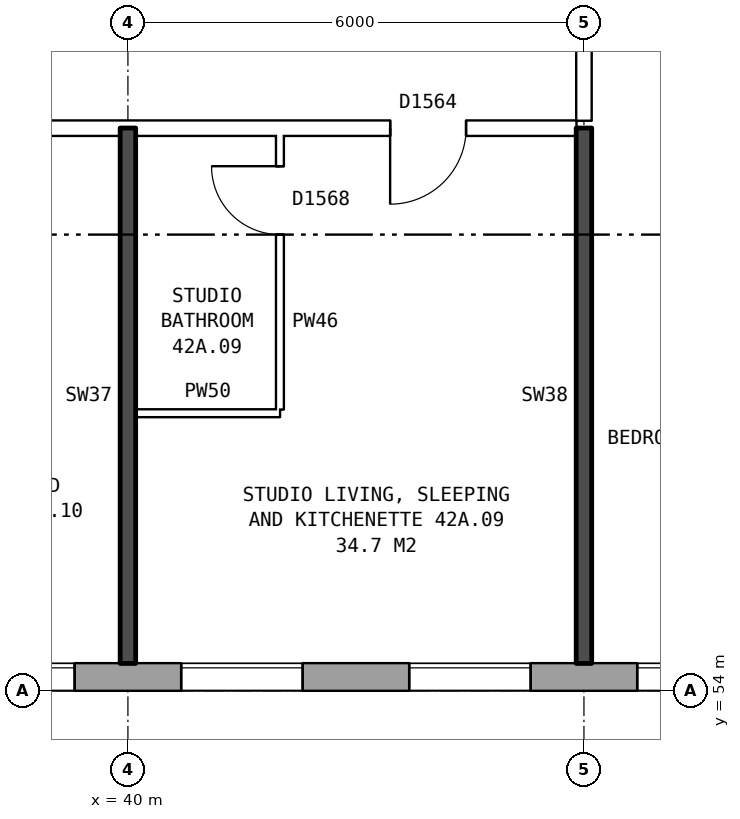
"""IFC4 building model, lengths in metres.
Left out: names, types, materials, properties, quantities, classifications, styles, units other than length and angle.
Written with IfcOpenShell. Run it as: python <this file> out.ifc"""

import sys

from ifc_helpers import new_model, si_unit, direction, frame, frame_2d, origin, place, context, subcontext, project, spatial, rectangle, extrude, element, fill, save


model = new_model("IFC4")
c1 = context("Model", 3, precision=1e-05, world=origin(), true_north=direction((0.0, 1.0)))
c2 = subcontext(c1, "Body", "Model", "MODEL_VIEW")
j1 = project(units=[si_unit("LENGTHUNIT", "METRE"), si_unit("PLANEANGLEUNIT", "RADIAN")], contexts=[c1])
p1 = place(None, origin())
s1 = spatial("IfcSite", under=j1, at=p1, CompositionType="ELEMENT")
p2 = place(p1, origin())
s2 = spatial("IfcBuilding", under=s1, at=p2, CompositionType="ELEMENT")
p3 = place(p2, frame((0.0, 0.0, 151.6)))
s3 = spatial("IfcBuildingStorey", under=s2, at=p3, CompositionType="ELEMENT", Elevation=151.6)
p4 = place(p3, frame((31.575, 54.18, 0.0), z_axis=(0.0, 0.0, 1.0), x_axis=(1.0, 0.0, 0.0)))
e1 = element("IfcWall", 1, at=p4, inside=s3, PredefinedType="STANDARD", context=c2, shape_type="SweptSolid", body=[
    extrude(rectangle(XDim=41.351, YDim=0.36, at=frame_2d((20.675, 0.0))), origin(), (0.0, 0.0, 1.0), 2.85),
])
p5 = place(p4, frame((4.625, 0.0, 0.8)))
e2 = element("IfcOpeningElement", 2, at=p5, cuts=e1, PredefinedType="OPENING", context=c2, shape_type="SweptSolid", body=[
    extrude(rectangle(XDim=1.2, YDim=1.2, at=frame_2d((0.6, 0.6))), frame((0.0, 0.19, 0.0), z_axis=(0.0, -1.0, 0.0), x_axis=(1.0, 0.0, 0.0)), (0.0, 0.0, 1.0), 0.38),
])
p6 = place(p4, frame((6.125, 0.0, 0.8)))
e3 = element("IfcOpeningElement", 3, at=p6, cuts=e1, PredefinedType="OPENING", context=c2, shape_type="SweptSolid", body=[
    extrude(rectangle(XDim=1.6, YDim=1.8, at=frame_2d((0.8, 0.9))), frame((0.0, 0.19, 0.0), z_axis=(0.0, -1.0, 0.0), x_axis=(1.0, 0.0, 0.0)), (0.0, 0.0, 1.0), 0.38),
])
p7 = place(p4, frame((9.125, 0.0, 0.8)))
e4 = element("IfcOpeningElement", 4, at=p7, cuts=e1, PredefinedType="OPENING", context=c2, shape_type="SweptSolid", body=[
    extrude(rectangle(XDim=1.6, YDim=1.8, at=frame_2d((0.8, 0.9))), frame((0.0, 0.19, 0.0), z_axis=(0.0, -1.0, 0.0), x_axis=(1.0, 0.0, 0.0)), (0.0, 0.0, 1.0), 0.38),
])
p8 = place(p4, frame((12.125, 0.0, 0.8)))
e5 = element("IfcOpeningElement", 5, at=p8, cuts=e1, PredefinedType="OPENING", context=c2, shape_type="SweptSolid", body=[
    extrude(rectangle(XDim=1.6, YDim=1.8, at=frame_2d((0.8, 0.9))), frame((0.0, 0.19, 0.0), z_axis=(0.0, -1.0, 0.0), x_axis=(1.0, 0.0, 0.0)), (0.0, 0.0, 1.0), 0.38),
])
p9 = place(p4, frame((15.125, 0.0, 0.8)))
e6 = element("IfcOpeningElement", 6, at=p9, cuts=e1, PredefinedType="OPENING", context=c2, shape_type="SweptSolid", body=[
    extrude(rectangle(XDim=1.6, YDim=1.8, at=frame_2d((0.8, 0.9))), frame((0.0, 0.19, 0.0), z_axis=(0.0, -1.0, 0.0), x_axis=(1.0, 0.0, 0.0)), (0.0, 0.0, 1.0), 0.38),
])
p10 = place(p4, frame((18.125, 0.0, 0.8)))
e7 = element("IfcOpeningElement", 7, at=p10, cuts=e1, PredefinedType="OPENING", context=c2, shape_type="SweptSolid", body=[
    extrude(rectangle(XDim=1.6, YDim=1.8, at=frame_2d((0.8, 0.9))), frame((0.0, 0.19, 0.0), z_axis=(0.0, -1.0, 0.0), x_axis=(1.0, 0.0, 0.0)), (0.0, 0.0, 1.0), 0.38),
])
p11 = place(p4, frame((21.125, 0.0, 0.8)))
e8 = element("IfcOpeningElement", 8, at=p11, cuts=e1, PredefinedType="OPENING", context=c2, shape_type="SweptSolid", body=[
    extrude(rectangle(XDim=1.6, YDim=1.8, at=frame_2d((0.8, 0.9))), frame((0.0, 0.19, 0.0), z_axis=(0.0, -1.0, 0.0), x_axis=(1.0, 0.0, 0.0)), (0.0, 0.0, 1.0), 0.38),
])
p12 = place(p4, frame((24.125, 0.0, 0.8)))
e9 = element("IfcOpeningElement", 9, at=p12, cuts=e1, PredefinedType="OPENING", context=c2, shape_type="SweptSolid", body=[
    extrude(rectangle(XDim=1.6, YDim=1.8, at=frame_2d((0.8, 0.9))), frame((0.0, 0.19, 0.0), z_axis=(0.0, -1.0, 0.0), x_axis=(1.0, 0.0, 0.0)), (0.0, 0.0, 1.0), 0.38),
])
p13 = place(p4, frame((27.125, 0.0, 0.8)))
e10 = element("IfcOpeningElement", 10, at=p13, cuts=e1, PredefinedType="OPENING", context=c2, shape_type="SweptSolid", body=[
    extrude(rectangle(XDim=1.6, YDim=1.8, at=frame_2d((0.8, 0.9))), frame((0.0, 0.19, 0.0), z_axis=(0.0, -1.0, 0.0), x_axis=(1.0, 0.0, 0.0)), (0.0, 0.0, 1.0), 0.38),
])
p14 = place(p4, frame((30.125, 0.0, 0.8)))
e11 = element("IfcOpeningElement", 11, at=p14, cuts=e1, PredefinedType="OPENING", context=c2, shape_type="SweptSolid", body=[
    extrude(rectangle(XDim=1.6, YDim=1.8, at=frame_2d((0.8, 0.9))), frame((0.0, 0.19, 0.0), z_axis=(0.0, -1.0, 0.0), x_axis=(1.0, 0.0, 0.0)), (0.0, 0.0, 1.0), 0.38),
])
p15 = place(p4, frame((33.125, 0.0, 0.8)))
e12 = element("IfcOpeningElement", 12, at=p15, cuts=e1, PredefinedType="OPENING", context=c2, shape_type="SweptSolid", body=[
    extrude(rectangle(XDim=1.6, YDim=1.8, at=frame_2d((0.8, 0.9))), frame((0.0, 0.19, 0.0), z_axis=(0.0, -1.0, 0.0), x_axis=(1.0, 0.0, 0.0)), (0.0, 0.0, 1.0), 0.38),
])
p16 = place(p4, frame((35.025, 0.0, 0.8)))
e13 = element("IfcOpeningElement", 13, at=p16, cuts=e1, PredefinedType="OPENING", context=c2, shape_type="SweptSolid", body=[
    extrude(rectangle(XDim=0.8, YDim=1.8, at=frame_2d((0.4, 0.9))), frame((0.0, 0.19, 0.0), z_axis=(0.0, -1.0, 0.0), x_axis=(1.0, 0.0, 0.0)), (0.0, 0.0, 1.0), 0.38),
])
p17 = place(p4, frame((38.625, 0.0, 1.5)))
e14 = element("IfcOpeningElement", 14, at=p17, cuts=e1, PredefinedType="OPENING", context=c2, shape_type="SweptSolid", body=[
    extrude(rectangle(XDim=0.6, YDim=0.9, at=frame_2d((0.3, 0.45))), frame((0.0, 0.19, 0.0), z_axis=(0.0, -1.0, 0.0), x_axis=(1.0, 0.0, 0.0)), (0.0, 0.0, 1.0), 0.38),
])
p18 = place(p4, frame((36.125, 0.0, 0.8)))
e15 = element("IfcOpeningElement", 15, at=p18, cuts=e1, PredefinedType="OPENING", context=c2, shape_type="SweptSolid", body=[
    extrude(rectangle(XDim=1.0, YDim=0.9, at=frame_2d((0.5, 0.45))), frame((0.0, 0.19, 0.0), z_axis=(0.0, -1.0, 0.0), x_axis=(1.0, 0.0, 0.0)), (0.0, 0.0, 1.0), 0.38),
])
p19 = place(p4, frame((39.525, 0.0, 0.8)))
e16 = element("IfcOpeningElement", 16, at=p19, cuts=e1, PredefinedType="OPENING", context=c2, shape_type="SweptSolid", body=[
    extrude(rectangle(XDim=1.4, YDim=1.8, at=frame_2d((0.7, 0.9))), frame((0.0, 0.19, 0.0), z_axis=(0.0, -1.0, 0.0), x_axis=(1.0, 0.0, 0.0)), (0.0, 0.0, 1.0), 0.38),
])
p20 = place(p3, frame((40.1, 57.65, 0.0), z_axis=(0.0, 0.0, 1.0), x_axis=(1.0, 0.0, 0.0)))
e17 = element("IfcWall", 17, at=p20, inside=s3, PredefinedType="PARTITIONING", context=c2, shape_type="SweptSolid", body=[
    extrude(rectangle(XDim=1.9, YDim=0.1, at=frame_2d((0.95, 0.0))), origin(), (0.0, 0.0, 1.0), 2.85),
])
p21 = place(p3, frame((28.86, 61.4, 0.0), z_axis=(0.0, 0.0, 1.0), x_axis=(1.0, 0.0, 0.0)))
e18 = element("IfcWall", 18, at=p21, inside=s3, PredefinedType="PARTITIONING", context=c2, shape_type="SweptSolid", body=[
    extrude(rectangle(XDim=17.04, YDim=0.2, at=frame_2d((8.52, 0.0))), origin(), (0.0, 0.0, 1.0), 2.85),
])
p22 = place(p21, frame((14.59, 0.0, 0.0)))
e19 = element("IfcOpeningElement", 19, at=p22, cuts=e18, PredefinedType="OPENING", context=c2, shape_type="SweptSolid", body=[
    extrude(rectangle(XDim=1.0, YDim=2.1, at=frame_2d((0.5, 1.05))), frame((0.0, 0.11, 0.0), z_axis=(0.0, -1.0, 0.0), x_axis=(1.0, 0.0, 0.0)), (0.0, 0.0, 1.0), 0.22),
])
p23 = place(p21, frame((7.64, 0.0, 0.0)))
e20 = element("IfcOpeningElement", 20, at=p23, cuts=e18, PredefinedType="OPENING", context=c2, shape_type="SweptSolid", body=[
    extrude(rectangle(XDim=1.0, YDim=2.1, at=frame_2d((0.5, 1.05))), frame((0.0, 0.11, 0.0), z_axis=(0.0, -1.0, 0.0), x_axis=(1.0, 0.0, 0.0)), (0.0, 0.0, 1.0), 0.22),
])
p24 = place(p3, frame((40.0, 54.36, 0.0), z_axis=(0.0, 0.0, 1.0), x_axis=(0.0, 1.0, 0.0)))
e21 = element("IfcWall", 21, at=p24, inside=s3, PredefinedType="SOLIDWALL", context=c2, shape_type="SweptSolid", body=[
    extrude(rectangle(XDim=7.04, YDim=0.2, at=frame_2d((3.52, 0.0))), origin(), (0.0, 0.0, 1.0), 2.85),
])
p25 = place(p3, frame((42.0, 57.7, 0.0), z_axis=(0.0, 0.0, 1.0), x_axis=(0.0, 1.0, 0.0)))
e22 = element("IfcWall", 22, at=p25, inside=s3, PredefinedType="PARTITIONING", context=c2, shape_type="SweptSolid", body=[
    extrude(rectangle(XDim=3.6, YDim=0.1, at=frame_2d((1.8, 0.0))), origin(), (0.0, 0.0, 1.0), 2.85),
])
p26 = place(p25, frame((2.3, 0.0, 0.0)))
e23 = element("IfcOpeningElement", 23, at=p26, cuts=e22, PredefinedType="OPENING", context=c2, shape_type="SweptSolid", body=[
    extrude(rectangle(XDim=0.9, YDim=2.1, at=frame_2d((0.45, 1.05))), frame((0.0, 0.06, 0.0), z_axis=(0.0, -1.0, 0.0), x_axis=(1.0, 0.0, 0.0)), (0.0, 0.0, 1.0), 0.12),
])
p27 = place(p3, frame((46.0, 54.36, 0.0), z_axis=(0.0, 0.0, 1.0), x_axis=(0.0, 1.0, 0.0)))
e24 = element("IfcWall", 24, at=p27, inside=s3, PredefinedType="SOLIDWALL", context=c2, shape_type="SweptSolid", body=[
    extrude(rectangle(XDim=7.04, YDim=0.2, at=frame_2d((3.52, 0.0))), origin(), (0.0, 0.0, 1.0), 2.85),
])
p28 = place(p3, frame((46.0, 61.5, 0.0), z_axis=(0.0, 0.0, 1.0), x_axis=(0.0, 1.0, 0.0)))
e25 = element("IfcWall", 25, at=p28, inside=s3, PredefinedType="PARTITIONING", context=c2, shape_type="SweptSolid", body=[
    extrude(rectangle(XDim=2.2, YDim=0.2, at=frame_2d((1.1, 0.0))), origin(), (0.0, 0.0, 1.0), 2.85),
])
p29 = place(p6, origin())
e26 = element("IfcWindow", 26, at=p29, inside=s3, PartitioningType="SINGLE_PANEL", PredefinedType="WINDOW", context=c2, shape_type="SweptSolid", body=[
    extrude(rectangle(XDim=1.6, YDim=1.8, at=frame_2d((0.8, 0.9))), frame((0.0, 0.15, 0.0), z_axis=(0.0, -1.0, 0.0), x_axis=(1.0, 0.0, 0.0)), (0.0, 0.0, 1.0), 0.06),
])
fill(e3, e26)
p30 = place(p7, origin())
e27 = element("IfcWindow", 27, at=p30, inside=s3, PartitioningType="SINGLE_PANEL", PredefinedType="WINDOW", context=c2, shape_type="SweptSolid", body=[
    extrude(rectangle(XDim=1.6, YDim=1.8, at=frame_2d((0.8, 0.9))), frame((0.0, 0.15, 0.0), z_axis=(0.0, -1.0, 0.0), x_axis=(1.0, 0.0, 0.0)), (0.0, 0.0, 1.0), 0.06),
])
fill(e4, e27)
p31 = place(p8, origin())
e28 = element("IfcWindow", 28, at=p31, inside=s3, PartitioningType="SINGLE_PANEL", PredefinedType="WINDOW", context=c2, shape_type="SweptSolid", body=[
    extrude(rectangle(XDim=1.6, YDim=1.8, at=frame_2d((0.8, 0.9))), frame((0.0, 0.15, 0.0), z_axis=(0.0, -1.0, 0.0), x_axis=(1.0, 0.0, 0.0)), (0.0, 0.0, 1.0), 0.06),
])
fill(e5, e28)
p32 = place(p9, origin())
e29 = element("IfcWindow", 29, at=p32, inside=s3, PartitioningType="SINGLE_PANEL", PredefinedType="WINDOW", context=c2, shape_type="SweptSolid", body=[
    extrude(rectangle(XDim=1.6, YDim=1.8, at=frame_2d((0.8, 0.9))), frame((0.0, 0.15, 0.0), z_axis=(0.0, -1.0, 0.0), x_axis=(1.0, 0.0, 0.0)), (0.0, 0.0, 1.0), 0.06),
])
fill(e6, e29)
p33 = place(p22, frame((1.0, 0.0, 0.0), z_axis=(0.0, 0.0, 1.0), x_axis=(-1.0, 0.0, 0.0)))
e30 = element("IfcDoor", 30, at=p33, inside=s3, OperationType="SINGLE_SWING_RIGHT", PredefinedType="DOOR", context=c2, shape_type="SweptSolid", body=[
    extrude(rectangle(XDim=1.0, YDim=2.1, at=frame_2d((0.5, 1.05))), frame((0.0, 0.025, 0.0), z_axis=(0.0, -1.0, 0.0), x_axis=(1.0, 0.0, 0.0)), (0.0, 0.0, 1.0), 0.05),
])
fill(e19, e30)
p34 = place(p26, origin())
e31 = element("IfcDoor", 31, at=p34, inside=s3, OperationType="SINGLE_SWING_RIGHT", PredefinedType="DOOR", context=c2, shape_type="SweptSolid", body=[
    extrude(rectangle(XDim=0.9, YDim=2.1, at=frame_2d((0.45, 1.05))), frame((0.0, 0.025, 0.0), z_axis=(0.0, -1.0, 0.0), x_axis=(1.0, 0.0, 0.0)), (0.0, 0.0, 1.0), 0.05),
])
fill(e23, e31)
save(model, sys.argv[1])
